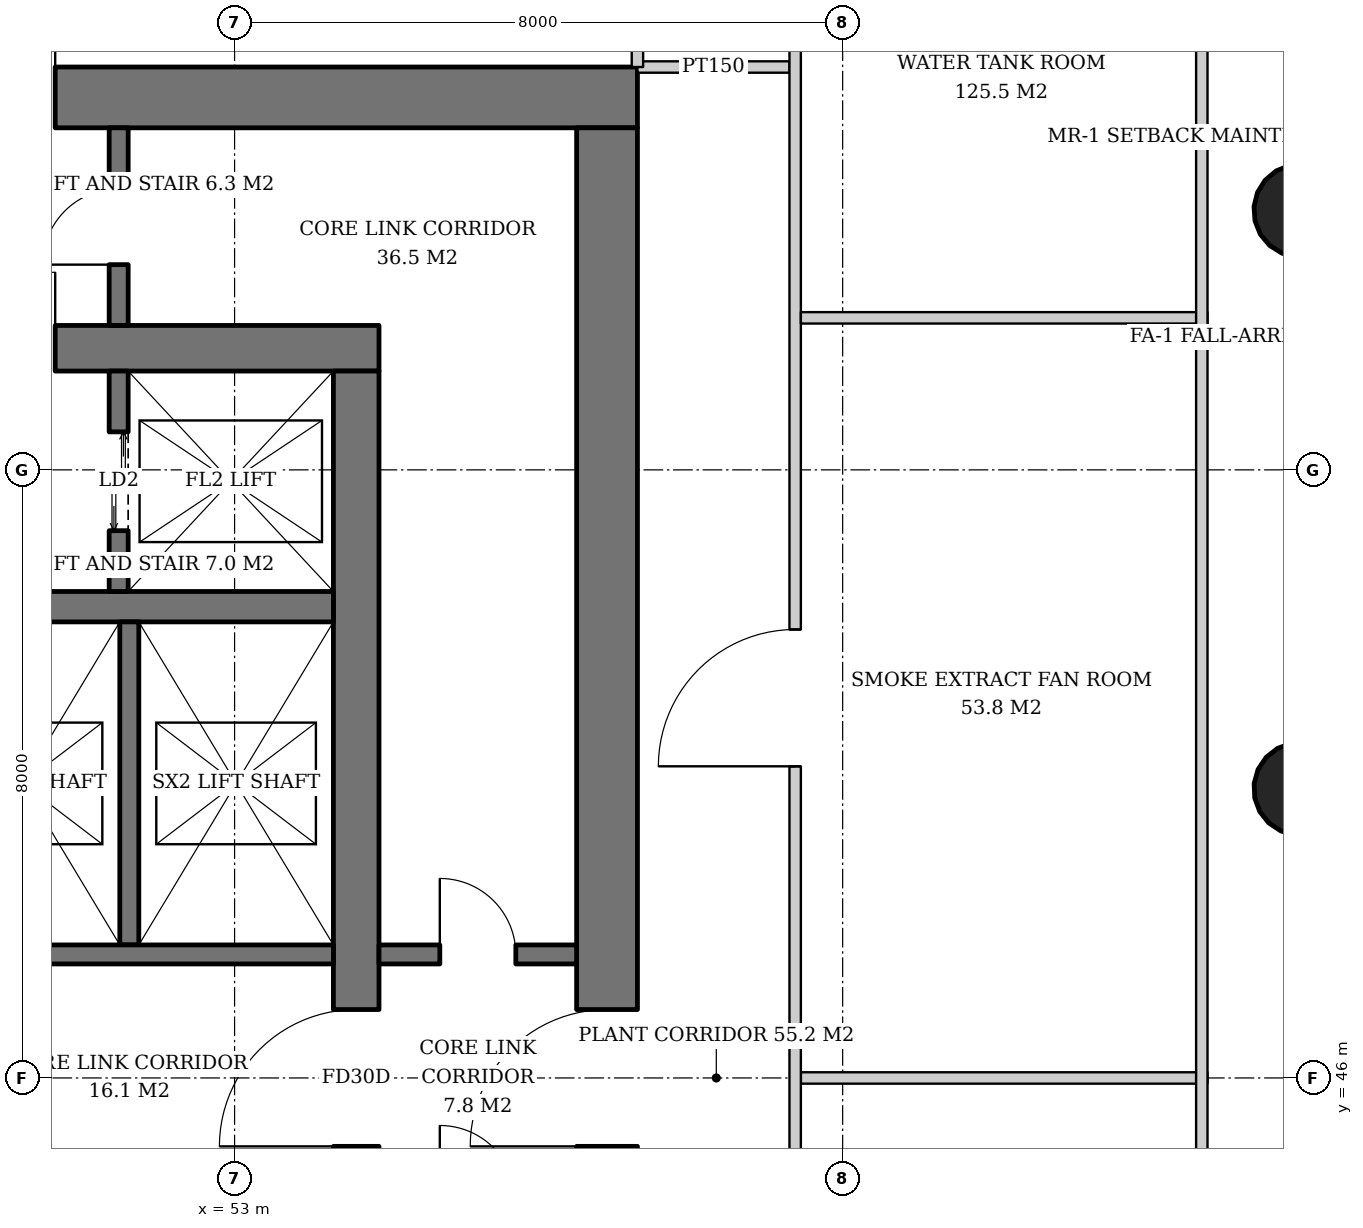
"""IFC4 building model, lengths in metres.
Left out: names, types, materials, properties, quantities, classifications, styles, units other than length and angle.
Written with IfcOpenShell. Run it as: python <this file> out.ifc"""

import sys

from ifc_helpers import new_model, si_unit, direction, frame, frame_2d, origin, origin_2d, place, context, subcontext, project, spatial, rectangle, hollow_circle, extrude, element, fill, save


model = new_model("IFC4")
c1 = context("Model", 3, precision=1e-05, world=origin(), true_north=direction((0.0, 1.0)))
c2 = subcontext(c1, "Body", "Model", "MODEL_VIEW")
j1 = project(units=[si_unit("LENGTHUNIT", "METRE"), si_unit("PLANEANGLEUNIT", "RADIAN")], contexts=[c1])
p1 = place(None, origin())
s1 = spatial("IfcSite", under=j1, at=p1, CompositionType="ELEMENT")
p2 = place(p1, origin())
s2 = spatial("IfcBuilding", under=s1, at=p2, CompositionType="ELEMENT")
p3 = place(p2, frame((0.0, 0.0, 81.8)))
s3 = spatial("IfcBuildingStorey", under=s2, at=p3, CompositionType="ELEMENT", Elevation=81.8)
p4 = place(p3, frame((67.057, 49.812, 0.0), z_axis=(-0.031913690376, -0.006421265669, 0.999470001408), x_axis=(0.197254006954, -0.980352414563, 0.0)))
e1 = element("IfcColumn", 1, at=p4, inside=s3, PredefinedType="COLUMN", context=c2, shape_type="SweptSolid", body=[
    extrude(hollow_circle(Radius=0.61, WallThickness=0.04, at=origin_2d()), origin(), (0.0, 0.0, 1.0), 3.802),
])
p5 = place(p3, frame((67.057, 57.434, 0.0), z_axis=(-0.031908467525, -0.019196442233, 0.999306432635), x_axis=(0.515509579284, -0.856883815734, 0.0)))
e2 = element("IfcColumn", 2, at=p5, inside=s3, PredefinedType="COLUMN", context=c2, shape_type="SweptSolid", body=[
    extrude(hollow_circle(Radius=0.61, WallThickness=0.04, at=origin_2d()), origin(), (0.0, 0.0, 1.0), 3.803),
])
p6 = place(p3, frame((35.1, 55.6, 0.0), z_axis=(0.0, 0.0, 1.0), x_axis=(1.0, 0.0, 0.0)))
e3 = element("IfcWall", 3, at=p6, inside=s3, PredefinedType="SHEAR", context=c2, shape_type="SweptSolid", body=[
    extrude(rectangle(XDim=19.8, YDim=0.6, at=frame_2d((9.9, 0.0))), origin(), (0.0, 0.0, 1.0), 3.8),
])
p7 = place(p6, frame((14.54, 0.0, 0.0)))
e4 = element("IfcOpeningElement", 4, at=p7, cuts=e3, PredefinedType="OPENING", context=c2, shape_type="SweptSolid", body=[
    extrude(rectangle(XDim=1.0, YDim=2.1, at=frame_2d((0.5, 1.05))), frame((0.0, 0.31, 0.0), z_axis=(0.0, -1.0, 0.0), x_axis=(1.0, 0.0, 0.0)), (0.0, 0.0, 1.0), 0.62),
])
p8 = place(p6, frame((2.425, 0.0, 0.0)))
e5 = element("IfcOpeningElement", 5, at=p8, cuts=e3, PredefinedType="OPENING", context=c2, shape_type="SweptSolid", body=[
    extrude(rectangle(XDim=1.0, YDim=2.1, at=frame_2d((0.5, 1.05))), frame((0.0, 0.31, 0.0), z_axis=(0.0, -1.0, 0.0), x_axis=(1.0, 0.0, 0.0)), (0.0, 0.0, 1.0), 0.62),
])
p9 = place(p3, frame((54.6, 36.7, 0.0), z_axis=(0.0, 0.0, 1.0), x_axis=(0.0, 1.0, 0.0)))
e6 = element("IfcWall", 6, at=p9, inside=s3, PredefinedType="SHEAR", context=c2, shape_type="SweptSolid", body=[
    extrude(rectangle(XDim=18.6, YDim=0.6, at=frame_2d((9.3, 0.0))), origin(), (0.0, 0.0, 1.0), 3.8),
])
p10 = place(p9, frame((8.4, 0.0, 0.0)))
e7 = element("IfcOpeningElement", 7, at=p10, cuts=e6, PredefinedType="OPENING", context=c2, shape_type="SweptSolid", body=[
    extrude(rectangle(XDim=1.8, YDim=2.4, at=frame_2d((0.9, 1.2))), frame((0.0, 0.31, 0.0), z_axis=(0.0, -1.0, 0.0), x_axis=(1.0, 0.0, 0.0)), (0.0, 0.0, 1.0), 0.62),
])
p11 = place(p3, frame((31.7, 58.9, 0.0), z_axis=(0.0, 0.0, 1.0), x_axis=(1.0, 0.0, 0.0)))
e8 = element("IfcWall", 8, at=p11, inside=s3, PredefinedType="SHEAR", context=c2, shape_type="SweptSolid", body=[
    extrude(rectangle(XDim=26.6, YDim=0.8, at=frame_2d((13.3, 0.0))), origin(), (0.0, 0.0, 1.0), 3.8),
])
p12 = place(p11, frame((17.94, 0.0, 0.0)))
e9 = element("IfcOpeningElement", 9, at=p12, cuts=e8, PredefinedType="OPENING", context=c2, shape_type="SweptSolid", body=[
    extrude(rectangle(XDim=1.0, YDim=2.1, at=frame_2d((0.5, 1.05))), frame((0.0, 0.41, 0.0), z_axis=(0.0, -1.0, 0.0), x_axis=(1.0, 0.0, 0.0)), (0.0, 0.0, 1.0), 0.82),
])
p13 = place(p11, frame((5.825, 0.0, 0.0)))
e10 = element("IfcOpeningElement", 10, at=p13, cuts=e8, PredefinedType="OPENING", context=c2, shape_type="SweptSolid", body=[
    extrude(rectangle(XDim=1.0, YDim=2.1, at=frame_2d((0.5, 1.05))), frame((0.0, 0.41, 0.0), z_axis=(0.0, -1.0, 0.0), x_axis=(1.0, 0.0, 0.0)), (0.0, 0.0, 1.0), 0.82),
])
p14 = place(p11, frame((1.233, 0.0, 0.0)))
e11 = element("IfcOpeningElement", 11, at=p14, cuts=e8, PredefinedType="OPENING", context=c2, shape_type="SweptSolid", body=[
    extrude(rectangle(XDim=1.0, YDim=2.1, at=frame_2d((0.5, 1.05))), frame((0.0, 0.41, 0.0), z_axis=(0.0, -1.0, 0.0), x_axis=(1.0, 0.0, 0.0)), (0.0, 0.0, 1.0), 0.82),
])
p15 = place(p11, frame((3.479, 0.0, 0.0)))
e12 = element("IfcOpeningElement", 12, at=p15, cuts=e8, PredefinedType="OPENING", context=c2, shape_type="SweptSolid", body=[
    extrude(rectangle(XDim=1.0, YDim=2.1, at=frame_2d((0.5, 1.05))), frame((0.0, 0.41, 0.0), z_axis=(0.0, -1.0, 0.0), x_axis=(1.0, 0.0, 0.0)), (0.0, 0.0, 1.0), 0.82),
])
p16 = place(p3, frame((57.9, 33.5, 0.0), z_axis=(0.0, 0.0, 1.0), x_axis=(0.0, 1.0, 0.0)))
e13 = element("IfcWall", 13, at=p16, inside=s3, PredefinedType="SHEAR", context=c2, shape_type="SweptSolid", body=[
    extrude(rectangle(XDim=25.0, YDim=0.8, at=frame_2d((12.5, 0.0))), origin(), (0.0, 0.0, 1.0), 3.8),
])
p17 = place(p16, frame((11.6, 0.0, 0.0)))
e14 = element("IfcOpeningElement", 14, at=p17, cuts=e13, PredefinedType="OPENING", context=c2, shape_type="SweptSolid", body=[
    extrude(rectangle(XDim=1.8, YDim=2.4, at=frame_2d((0.9, 1.2))), frame((0.0, 0.41, 0.0), z_axis=(0.0, -1.0, 0.0), x_axis=(1.0, 0.0, 0.0)), (0.0, 0.0, 1.0), 0.82),
])
p18 = place(p3, frame((35.7, 52.2, 0.0), z_axis=(0.0, 0.0, 1.0), x_axis=(1.0, 0.0, 0.0)))
e15 = element("IfcWall", 15, at=p18, inside=s3, PredefinedType="SHEAR", context=c2, shape_type="SweptSolid", body=[
    extrude(rectangle(XDim=18.6, YDim=0.4, at=frame_2d((9.3, 0.0))), origin(), (0.0, 0.0, 1.0), 3.8),
])
p19 = place(p3, frame((51.475, 52.4, 0.0), z_axis=(0.0, 0.0, 1.0), x_axis=(0.0, 1.0, 0.0)))
e16 = element("IfcWall", 16, at=p19, inside=s3, PredefinedType="SHEAR", context=c2, shape_type="SweptSolid", body=[
    extrude(rectangle(XDim=2.9, YDim=0.25, at=frame_2d((1.45, 0.0))), origin(), (0.0, 0.0, 1.0), 3.8),
])
p20 = place(p19, frame((0.8, 0.0, 0.0)))
e17 = element("IfcOpeningElement", 17, at=p20, cuts=e16, PredefinedType="OPENING", context=c2, shape_type="SweptSolid", body=[
    extrude(rectangle(XDim=1.3, YDim=2.2, at=frame_2d((0.65, 1.1))), frame((0.0, 0.135, 0.0), z_axis=(0.0, -1.0, 0.0), x_axis=(1.0, 0.0, 0.0)), (0.0, 0.0, 1.0), 0.27),
])
p21 = place(p3, frame((51.615, 47.75, 0.0), z_axis=(0.0, 0.0, 1.0), x_axis=(0.0, 1.0, 0.0)))
e18 = element("IfcWall", 18, at=p21, inside=s3, PredefinedType="SHEAR", context=c2, shape_type="SweptSolid", body=[
    extrude(rectangle(XDim=4.25, YDim=0.25, at=frame_2d((2.125, 0.0))), origin(), (0.0, 0.0, 1.0), 3.8),
])
p22 = place(p3, frame((48.93, 47.625, 0.0), z_axis=(0.0, 0.0, 1.0), x_axis=(1.0, 0.0, 0.0)))
e19 = element("IfcWall", 19, at=p22, inside=s3, PredefinedType="SHEAR", context=c2, shape_type="SweptSolid", body=[
    extrude(rectangle(XDim=5.37, YDim=0.25, at=frame_2d((2.685, 0.0))), origin(), (0.0, 0.0, 1.0), 3.8),
])
p23 = place(p3, frame((51.475, 55.9, 0.0), z_axis=(0.0, 0.0, 1.0), x_axis=(0.0, 1.0, 0.0)))
e20 = element("IfcWall", 20, at=p23, inside=s3, PredefinedType="SOLIDWALL", context=c2, shape_type="SweptSolid", body=[
    extrude(rectangle(XDim=2.6, YDim=0.25, at=frame_2d((1.3, 0.0))), origin(), (0.0, 0.0, 1.0), 3.52),
])
p24 = place(p23, frame((0.8, 0.0, 0.0)))
e21 = element("IfcOpeningElement", 21, at=p24, cuts=e20, PredefinedType="OPENING", context=c2, shape_type="SweptSolid", body=[
    extrude(rectangle(XDim=1.0, YDim=2.1, at=frame_2d((0.5, 1.05))), frame((0.0, 0.135, 0.0), z_axis=(0.0, -1.0, 0.0), x_axis=(1.0, 0.0, 0.0)), (0.0, 0.0, 1.0), 0.27),
])
p25 = place(p3, frame((54.9, 47.625, 0.0), z_axis=(0.0, 0.0, 1.0), x_axis=(1.0, 0.0, 0.0)))
e22 = element("IfcWall", 22, at=p25, inside=s3, PredefinedType="SOLIDWALL", context=c2, shape_type="SweptSolid", body=[
    extrude(rectangle(XDim=2.6, YDim=0.25, at=frame_2d((1.3, 0.0))), origin(), (0.0, 0.0, 1.0), 3.52),
])
p26 = place(p25, frame((0.8, 0.0, 0.0)))
e23 = element("IfcOpeningElement", 23, at=p26, cuts=e22, PredefinedType="OPENING", context=c2, shape_type="SweptSolid", body=[
    extrude(rectangle(XDim=1.0, YDim=2.1, at=frame_2d((0.5, 1.05))), frame((0.0, 0.135, 0.0), z_axis=(0.0, -1.0, 0.0), x_axis=(1.0, 0.0, 0.0)), (0.0, 0.0, 1.0), 0.27),
])
p27 = place(p3, frame((58.3, 59.3, 0.0), z_axis=(0.0, 0.0, 1.0), x_axis=(1.0, 0.0, 0.0)))
e24 = element("IfcWall", 24, at=p27, inside=s3, PredefinedType="PARTITIONING", context=c2, shape_type="SweptSolid", body=[
    extrude(rectangle(XDim=2.0, YDim=0.15, at=frame_2d((1.0, 0.0))), origin(), (0.0, 0.0, 1.0), 3.52),
])
p28 = place(p3, frame((60.45, 46.0, 0.0), z_axis=(0.0, 0.0, 1.0), x_axis=(1.0, 0.0, 0.0)))
e25 = element("IfcWall", 25, at=p28, inside=s3, PredefinedType="SOLIDWALL", context=c2, shape_type="SweptSolid", body=[
    extrude(rectangle(XDim=5.35, YDim=0.15, at=frame_2d((2.675, 0.0))), origin(), (0.0, 0.0, 1.0), 2.758),
])
p29 = place(p3, frame((60.375, 30.55, 0.0), z_axis=(0.0, 0.0, 1.0), x_axis=(0.0, 1.0, 0.0)))
e26 = element("IfcWall", 26, at=p29, inside=s3, PredefinedType="SOLIDWALL", context=c2, shape_type="SweptSolid", body=[
    extrude(rectangle(XDim=30.75, YDim=0.15, at=frame_2d((15.375, 0.0))), origin(), (0.0, 0.0, 1.0), 2.512),
])
p30 = place(p29, frame((2.85, 0.0, 0.0)))
e27 = element("IfcOpeningElement", 27, at=p30, cuts=e26, PredefinedType="OPENING", context=c2, shape_type="SweptSolid", body=[
    extrude(rectangle(XDim=1.0, YDim=2.1, at=frame_2d((0.5, 1.05))), frame((0.0, 0.085, 0.0), z_axis=(0.0, -1.0, 0.0), x_axis=(1.0, 0.0, 0.0)), (0.0, 0.0, 1.0), 0.17),
])
p31 = place(p29, frame((9.05, 0.0, 0.0)))
e28 = element("IfcOpeningElement", 28, at=p31, cuts=e26, PredefinedType="OPENING", context=c2, shape_type="SweptSolid", body=[
    extrude(rectangle(XDim=1.8, YDim=2.4, at=frame_2d((0.9, 1.2))), frame((0.0, 0.085, 0.0), z_axis=(0.0, -1.0, 0.0), x_axis=(1.0, 0.0, 0.0)), (0.0, 0.0, 1.0), 0.17),
])
p32 = place(p29, frame((19.55, 0.0, 0.0)))
e29 = element("IfcOpeningElement", 29, at=p32, cuts=e26, PredefinedType="OPENING", context=c2, shape_type="SweptSolid", body=[
    extrude(rectangle(XDim=1.8, YDim=2.4, at=frame_2d((0.9, 1.2))), frame((0.0, 0.085, 0.0), z_axis=(0.0, -1.0, 0.0), x_axis=(1.0, 0.0, 0.0)), (0.0, 0.0, 1.0), 0.17),
])
p33 = place(p3, frame((60.45, 56.0, 0.0), z_axis=(0.0, 0.0, 1.0), x_axis=(1.0, 0.0, 0.0)))
e30 = element("IfcWall", 30, at=p33, inside=s3, PredefinedType="SOLIDWALL", context=c2, shape_type="SweptSolid", body=[
    extrude(rectangle(XDim=5.35, YDim=0.15, at=frame_2d((2.675, 0.0))), origin(), (0.0, 0.0, 1.0), 3.52),
])
p34 = place(p3, frame((58.3, 59.3, 0.0), z_axis=(0.0, 0.0, 1.0), x_axis=(0.0, 1.0, 0.0)))
e31 = element("IfcWall", 31, at=p34, inside=s3, PredefinedType="PARTITIONING", context=c2, shape_type="SweptSolid", body=[
    extrude(rectangle(XDim=2.0, YDim=0.15, at=frame_2d((1.0, 0.0))), origin(), (0.0, 0.0, 1.0), 2.512),
])
p35 = place(p3, frame((65.725, 63.8, 0.0), z_axis=(0.0, 0.0, 1.0), x_axis=(0.0, -1.0, 0.0)))
e32 = element("IfcWall", 32, at=p35, inside=s3, PredefinedType="PARTITIONING", context=c2, shape_type="SweptSolid", body=[
    extrude(rectangle(XDim=35.6, YDim=0.15, at=frame_2d((17.8, 0.0))), origin(), (0.0, 0.0, 1.0), 2.512),
])
p36 = place(p20, origin())
e33 = element("IfcDoor", 33, at=p36, inside=s3, OperationType="DOUBLE_DOOR_SLIDING", PredefinedType="DOOR", context=c2, shape_type="SweptSolid", body=[
    extrude(rectangle(XDim=1.3, YDim=2.2, at=frame_2d((0.65, 1.1))), frame((0.0, 0.025, 0.0), z_axis=(0.0, -1.0, 0.0), x_axis=(1.0, 0.0, 0.0)), (0.0, 0.0, 1.0), 0.05),
])
fill(e17, e33)
p37 = place(p24, origin())
e34 = element("IfcDoor", 34, at=p37, inside=s3, OperationType="SINGLE_SWING_LEFT", PredefinedType="DOOR", context=c2, shape_type="SweptSolid", body=[
    extrude(rectangle(XDim=1.0, YDim=2.1, at=frame_2d((0.5, 1.05))), frame((0.0, 0.025, 0.0), z_axis=(0.0, -1.0, 0.0), x_axis=(1.0, 0.0, 0.0)), (0.0, 0.0, 1.0), 0.05),
])
fill(e21, e34)
p38 = place(p26, origin())
e35 = element("IfcDoor", 35, at=p38, inside=s3, OperationType="SINGLE_SWING_LEFT", PredefinedType="DOOR", context=c2, shape_type="SweptSolid", body=[
    extrude(rectangle(XDim=1.0, YDim=2.1, at=frame_2d((0.5, 1.05))), frame((0.0, 0.025, 0.0), z_axis=(0.0, -1.0, 0.0), x_axis=(1.0, 0.0, 0.0)), (0.0, 0.0, 1.0), 0.05),
])
fill(e23, e35)
p39 = place(p7, origin())
e36 = element("IfcDoor", 36, at=p39, inside=s3, OperationType="SINGLE_SWING_RIGHT", PredefinedType="DOOR", context=c2, shape_type="SweptSolid", body=[
    extrude(rectangle(XDim=1.0, YDim=2.1, at=frame_2d((0.5, 1.05))), frame((0.0, 0.025, 0.0), z_axis=(0.0, -1.0, 0.0), x_axis=(1.0, 0.0, 0.0)), (0.0, 0.0, 1.0), 0.05),
])
fill(e4, e36)
p40 = place(p10, origin())
e37 = element("IfcDoor", 37, at=p40, inside=s3, OperationType="DOUBLE_DOOR_SINGLE_SWING", PredefinedType="DOOR", context=c2, shape_type="SweptSolid", body=[
    extrude(rectangle(XDim=1.8, YDim=2.4, at=frame_2d((0.9, 1.2))), frame((0.0, 0.025, 0.0), z_axis=(0.0, -1.0, 0.0), x_axis=(1.0, 0.0, 0.0)), (0.0, 0.0, 1.0), 0.05),
])
fill(e7, e37)
p41 = place(p17, origin())
e38 = element("IfcDoor", 38, at=p41, inside=s3, OperationType="DOUBLE_DOOR_SINGLE_SWING", PredefinedType="DOOR", context=c2, shape_type="SweptSolid", body=[
    extrude(rectangle(XDim=1.8, YDim=2.4, at=frame_2d((0.9, 1.2))), frame((0.0, 0.025, 0.0), z_axis=(0.0, -1.0, 0.0), x_axis=(1.0, 0.0, 0.0)), (0.0, 0.0, 1.0), 0.05),
])
fill(e14, e38)
p42 = place(p12, origin())
e39 = element("IfcDoor", 39, at=p42, inside=s3, OperationType="SINGLE_SWING_RIGHT", PredefinedType="DOOR", context=c2, shape_type="SweptSolid", body=[
    extrude(rectangle(XDim=1.0, YDim=2.1, at=frame_2d((0.5, 1.05))), frame((0.0, 0.025, 0.0), z_axis=(0.0, -1.0, 0.0), x_axis=(1.0, 0.0, 0.0)), (0.0, 0.0, 1.0), 0.05),
])
fill(e9, e39)
p43 = place(p32, origin())
e40 = element("IfcDoor", 40, at=p43, inside=s3, OperationType="DOUBLE_DOOR_SINGLE_SWING", PredefinedType="DOOR", context=c2, shape_type="SweptSolid", body=[
    extrude(rectangle(XDim=1.8, YDim=2.4, at=frame_2d((0.9, 1.2))), frame((0.0, 0.025, 0.0), z_axis=(0.0, -1.0, 0.0), x_axis=(1.0, 0.0, 0.0)), (0.0, 0.0, 1.0), 0.05),
])
fill(e29, e40)
save(model, sys.argv[1])
